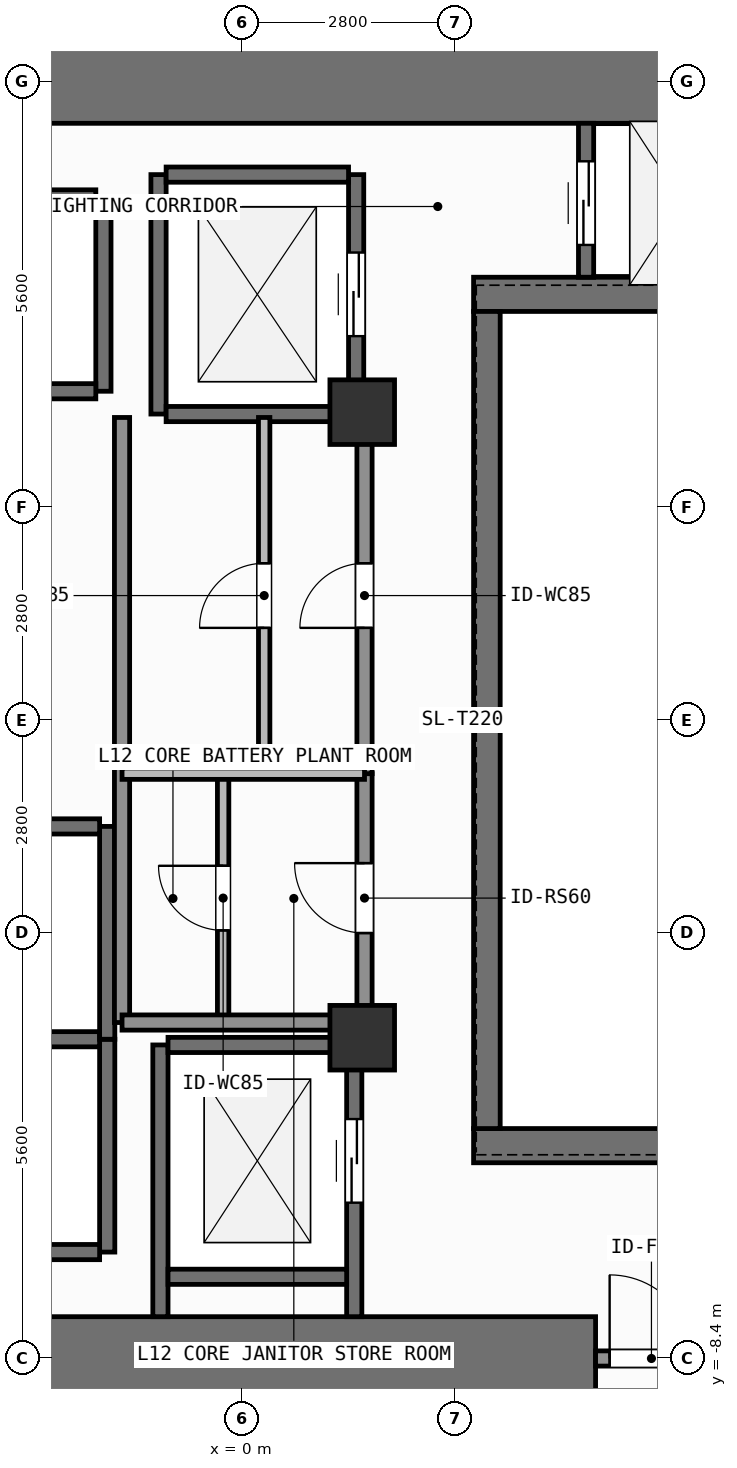
"""IFC4 building model, lengths in metres.
Left out: names, types, materials, properties, quantities, classifications, styles, units other than length and angle.
Written with IfcOpenShell. Run it as: python <this file> out.ifc"""

import sys

from ifc_helpers import new_model, si_unit, direction, frame, frame_2d, origin, origin_2d, place, context, subcontext, project, spatial, rectangle, extrude, element, fill, save


model = new_model("IFC4")
c1 = context("Model", 3, precision=1e-05, world=origin(), true_north=direction((0.0, 1.0)))
c2 = subcontext(c1, "Body", "Model", "MODEL_VIEW")
j1 = project(units=[si_unit("LENGTHUNIT", "METRE"), si_unit("PLANEANGLEUNIT", "RADIAN")], contexts=[c1])
p1 = place(None, origin())
s1 = spatial("IfcSite", under=j1, at=p1, CompositionType="ELEMENT")
p2 = place(p1, origin())
s2 = spatial("IfcBuilding", under=s1, at=p2, CompositionType="ELEMENT")
p3 = place(p2, frame((0.0, 0.0, 46.2)))
s3 = spatial("IfcBuildingStorey", under=s2, at=p3, CompositionType="ELEMENT", Elevation=46.2)
p4 = place(p3, frame((-2.62, -8.4, 0.0), z_axis=(0.0, 0.0, 1.0), x_axis=(1.0, 0.0, 0.0)))
e1 = element("IfcWall", 1, at=p4, inside=s3, PredefinedType="SHEAR", context=c2, shape_type="SweptSolid", body=[
    extrude(rectangle(XDim=7.27, YDim=1.1, at=frame_2d((3.635, 0.0))), origin(), (0.0, 0.0, 1.0), 3.9),
])
p5 = place(p3, frame((-7.55, 8.4, 0.0), z_axis=(0.0, 0.0, 1.0), x_axis=(1.0, 0.0, 0.0)))
e2 = element("IfcWall", 2, at=p5, inside=s3, PredefinedType="SHEAR", context=c2, shape_type="SweptSolid", body=[
    extrude(rectangle(XDim=16.5, YDim=1.1, at=frame_2d((8.25, 0.0))), origin(), (0.0, 0.0, 1.0), 3.9),
])
for number, where, z_axis, x_axis in (
    (3, (3.045, -5.6, 0.0), (0.0, 0.0, 1.0), (1.0, 0.0, 0.0)),
    (4, (3.045, 5.6, 0.0), (0.0, 0.0, 1.0), (1.0, 0.0, 0.0)),
):
    element("IfcWall", number, at=place(p3, frame(where, z_axis=z_axis, x_axis=x_axis)), inside=s3, PredefinedType="SHEAR", context=c2, shape_type="SweptSolid", body=[
        extrude(rectangle(XDim=5.905, YDim=0.45, at=frame_2d((2.953, 0.0))), origin(), (0.0, 0.0, 1.0), 3.9),
    ])
p6 = place(p3, frame((3.22, -5.375, 0.0), z_axis=(0.0, 0.0, 1.0), x_axis=(0.0, 1.0, 0.0)))
e5 = element("IfcWall", 5, at=p6, inside=s3, PredefinedType="SHEAR", context=c2, shape_type="SweptSolid", body=[
    extrude(rectangle(XDim=10.75, YDim=0.35, at=frame_2d((5.375, 0.0))), origin(), (0.0, 0.0, 1.0), 3.9),
])
for number, where, z_axis, x_axis in (
    (6, (1.58, -4.18, 0.0), (0.0, 0.0, 1.0), (1.0, 0.0, 0.0)),
    (7, (1.58, 4.05, 0.0), (0.0, 0.0, 1.0), (1.0, 0.0, 0.0)),
):
    element("IfcColumn", number, at=place(p3, frame(where, z_axis=z_axis, x_axis=x_axis)), inside=s3, PredefinedType="COLUMN", context=c2, shape_type="SweptSolid", body=[
        extrude(rectangle(XDim=0.85, YDim=0.85, at=origin_2d()), origin(), (0.0, 0.0, 1.0), 3.9),
    ])
p7 = place(p3, frame((-1.825, 4.325, 0.0), z_axis=(0.0, 0.0, 1.0), x_axis=(0.0, 1.0, 0.0)))
e8 = element("IfcWall", 8, at=p7, inside=s3, PredefinedType="SHEAR", context=c2, shape_type="SweptSolid", body=[
    extrude(rectangle(XDim=2.55, YDim=0.2, at=frame_2d((1.275, 0.0))), origin(), (0.0, 0.0, 1.0), 3.68),
])
for number, where, z_axis, x_axis in (
    (9, (-4.275, 4.325, 0.0), (0.0, 0.0, 1.0), (1.0, 0.0, 0.0)),
    (10, (-4.275, 6.875, 0.0), (0.0, 0.0, 1.0), (1.0, 0.0, 0.0)),
):
    element("IfcWall", number, at=place(p3, frame(where, z_axis=z_axis, x_axis=x_axis)), inside=s3, PredefinedType="SHEAR", context=c2, shape_type="SweptSolid", body=[
        extrude(rectangle(XDim=2.35, YDim=0.2, at=frame_2d((1.175, 0.0))), origin(), (0.0, 0.0, 1.0), 3.68),
    ])
p8 = place(p3, frame((-1.775, -7.0, 0.0), z_axis=(0.0, 0.0, 1.0), x_axis=(0.0, 1.0, 0.0)))
e11 = element("IfcWall", 11, at=p8, inside=s3, PredefinedType="SHEAR", context=c2, shape_type="SweptSolid", body=[
    extrude(rectangle(XDim=2.8, YDim=0.2, at=frame_2d((1.4, 0.0))), origin(), (0.0, 0.0, 1.0), 3.68),
])
for number, where, z_axis, x_axis in (
    (12, (-4.325, -7.0, 0.0), (0.0, 0.0, 1.0), (1.0, 0.0, 0.0)),
    (13, (-4.325, -4.2, 0.0), (0.0, 0.0, 1.0), (1.0, 0.0, 0.0)),
):
    element("IfcWall", number, at=place(p3, frame(where, z_axis=z_axis, x_axis=x_axis)), inside=s3, PredefinedType="SHEAR", context=c2, shape_type="SweptSolid", body=[
        extrude(rectangle(XDim=2.45, YDim=0.2, at=frame_2d((1.225, 0.0))), origin(), (0.0, 0.0, 1.0), 3.68),
    ])
p9 = place(p3, frame((-1.775, -4.2, 0.0), z_axis=(0.0, 0.0, 1.0), x_axis=(0.0, 1.0, 0.0)))
e14 = element("IfcWall", 14, at=p9, inside=s3, PredefinedType="SHEAR", context=c2, shape_type="SweptSolid", body=[
    extrude(rectangle(XDim=2.8, YDim=0.2, at=frame_2d((1.4, 0.0))), origin(), (0.0, 0.0, 1.0), 3.68),
])
p10 = place(p3, frame((-4.325, -1.4, 0.0), z_axis=(0.0, 0.0, 1.0), x_axis=(1.0, 0.0, 0.0)))
e15 = element("IfcWall", 15, at=p10, inside=s3, PredefinedType="SHEAR", context=c2, shape_type="SweptSolid", body=[
    extrude(rectangle(XDim=2.45, YDim=0.2, at=frame_2d((1.225, 0.0))), origin(), (0.0, 0.0, 1.0), 3.68),
])
p11 = place(p3, frame((-1.1, 4.025, 0.0), z_axis=(0.0, 0.0, 1.0), x_axis=(0.0, 1.0, 0.0)))
e16 = element("IfcWall", 16, at=p11, inside=s3, PredefinedType="SHEAR", context=c2, shape_type="SweptSolid", body=[
    extrude(rectangle(XDim=3.15, YDim=0.2, at=frame_2d((1.575, 0.0))), origin(), (0.0, 0.0, 1.0), 3.68),
])
p12 = place(p3, frame((1.5, 4.025, 0.0), z_axis=(0.0, 0.0, 1.0), x_axis=(0.0, 1.0, 0.0)))
e17 = element("IfcWall", 17, at=p12, inside=s3, PredefinedType="SHEAR", context=c2, shape_type="SweptSolid", body=[
    extrude(rectangle(XDim=3.15, YDim=0.2, at=frame_2d((1.575, 0.0))), origin(), (0.0, 0.0, 1.0), 3.68),
])
p13 = place(p12, frame((1.025, 0.0, 0.0)))
e18 = element("IfcOpeningElement", 18, at=p13, cuts=e17, PredefinedType="OPENING", context=c2, shape_type="SweptSolid", body=[
    extrude(rectangle(XDim=1.1, YDim=2.2, at=frame_2d((0.55, 1.1))), frame((0.0, 0.11, 0.0), z_axis=(0.0, -1.0, 0.0), x_axis=(1.0, 0.0, 0.0)), (0.0, 0.0, 1.0), 0.22),
])
for number, where, z_axis, x_axis in (
    (19, (-1.0, 4.025, 0.0), (0.0, 0.0, 1.0), (1.0, 0.0, 0.0)),
    (20, (-1.0, 7.175, 0.0), (0.0, 0.0, 1.0), (1.0, 0.0, 0.0)),
):
    element("IfcWall", number, at=place(p3, frame(where, z_axis=z_axis, x_axis=x_axis)), inside=s3, PredefinedType="SHEAR", context=c2, shape_type="SweptSolid", body=[
        extrude(rectangle(XDim=2.4, YDim=0.2, at=frame_2d((1.2, 0.0))), origin(), (0.0, 0.0, 1.0), 3.68),
    ])
p14 = place(p3, frame((-1.075, -7.85, 0.0), z_axis=(0.0, 0.0, 1.0), x_axis=(0.0, 1.0, 0.0)))
e21 = element("IfcWall", 21, at=p14, inside=s3, PredefinedType="SHEAR", context=c2, shape_type="SweptSolid", body=[
    extrude(rectangle(XDim=3.575, YDim=0.2, at=frame_2d((1.788, 0.0))), origin(), (0.0, 0.0, 1.0), 3.68),
])
p15 = place(p3, frame((1.475, -7.85, 0.0), z_axis=(0.0, 0.0, 1.0), x_axis=(0.0, 1.0, 0.0)))
e22 = element("IfcWall", 22, at=p15, inside=s3, PredefinedType="SHEAR", context=c2, shape_type="SweptSolid", body=[
    extrude(rectangle(XDim=3.575, YDim=0.2, at=frame_2d((1.788, 0.0))), origin(), (0.0, 0.0, 1.0), 3.68),
])
p16 = place(p15, frame((1.5, 0.0, 0.0)))
e23 = element("IfcOpeningElement", 23, at=p16, cuts=e22, PredefinedType="OPENING", context=c2, shape_type="SweptSolid", body=[
    extrude(rectangle(XDim=1.1, YDim=2.2, at=frame_2d((0.55, 1.1))), frame((0.0, 0.11, 0.0), z_axis=(0.0, -1.0, 0.0), x_axis=(1.0, 0.0, 0.0)), (0.0, 0.0, 1.0), 0.22),
])
for number, where, z_axis, x_axis in (
    (24, (-0.975, -7.325, 0.0), (0.0, 0.0, 1.0), (1.0, 0.0, 0.0)),
    (25, (-0.975, -4.275, 0.0), (0.0, 0.0, 1.0), (1.0, 0.0, 0.0)),
):
    element("IfcWall", number, at=place(p3, frame(where, z_axis=z_axis, x_axis=x_axis)), inside=s3, PredefinedType="SHEAR", context=c2, shape_type="SweptSolid", body=[
        extrude(rectangle(XDim=2.35, YDim=0.2, at=frame_2d((1.175, 0.0))), origin(), (0.0, 0.0, 1.0), 3.68),
    ])
p17 = place(p3, frame((4.525, 5.825, 0.0), z_axis=(0.0, 0.0, 1.0), x_axis=(0.0, 1.0, 0.0)))
e26 = element("IfcWall", 26, at=p17, inside=s3, PredefinedType="SHEAR", context=c2, shape_type="SweptSolid", body=[
    extrude(rectangle(XDim=2.025, YDim=0.2, at=frame_2d((1.013, 0.0))), origin(), (0.0, 0.0, 1.0), 3.68),
])
p18 = place(p17, frame((0.425, 0.0, 0.0)))
e27 = element("IfcOpeningElement", 27, at=p18, cuts=e26, PredefinedType="OPENING", context=c2, shape_type="SweptSolid", body=[
    extrude(rectangle(XDim=1.1, YDim=2.2, at=frame_2d((0.55, 1.1))), frame((0.0, 0.11, 0.0), z_axis=(0.0, -1.0, 0.0), x_axis=(1.0, 0.0, 0.0)), (0.0, 0.0, 1.0), 0.22),
])
p19 = place(p3, frame((4.65, -8.4, 0.0), z_axis=(0.0, 0.0, 1.0), x_axis=(1.0, 0.0, 0.0)))
e28 = element("IfcWall", 28, at=p19, inside=s3, PredefinedType="SOLIDWALL", context=c2, shape_type="SweptSolid", body=[
    extrude(rectangle(XDim=1.47, YDim=0.2, at=frame_2d((0.735, 0.0))), origin(), (0.0, 0.0, 1.0), 2.72),
])
p20 = place(p19, frame((0.185, 0.0, 0.0)))
e29 = element("IfcOpeningElement", 29, at=p20, cuts=e28, PredefinedType="OPENING", context=c2, shape_type="SweptSolid", body=[
    extrude(rectangle(XDim=1.1, YDim=2.15, at=frame_2d((0.55, 1.075))), frame((0.0, 0.11, 0.0), z_axis=(0.0, -1.0, 0.0), x_axis=(1.0, 0.0, 0.0)), (0.0, 0.0, 1.0), 0.22),
])
p21 = place(p3, frame((-0.25, -3.98, 0.0), z_axis=(0.0, 0.0, 1.0), x_axis=(0.0, 1.0, 0.0)))
e30 = element("IfcWall", 30, at=p21, inside=s3, PredefinedType="PARTITIONING", context=c2, shape_type="SweptSolid", body=[
    extrude(rectangle(XDim=3.274, YDim=0.15, at=frame_2d((1.637, 0.0))), origin(), (0.0, 0.0, 1.0), 3.68),
])
p22 = place(p21, frame((1.212, 0.0, 0.0)))
e31 = element("IfcOpeningElement", 31, at=p22, cuts=e30, PredefinedType="OPENING", context=c2, shape_type="SweptSolid", body=[
    extrude(rectangle(XDim=0.85, YDim=2.1, at=frame_2d((0.425, 1.05))), frame((0.0, 0.085, 0.0), z_axis=(0.0, -1.0, 0.0), x_axis=(1.0, 0.0, 0.0)), (0.0, 0.0, 1.0), 0.17),
])
p23 = place(p3, frame((0.29, -0.706, 0.0), z_axis=(0.0, 0.0, 1.0), x_axis=(0.0, 1.0, 0.0)))
e32 = element("IfcWall", 32, at=p23, inside=s3, PredefinedType="PARTITIONING", context=c2, shape_type="SweptSolid", body=[
    extrude(rectangle(XDim=4.686, YDim=0.15, at=frame_2d((2.343, 0.0))), origin(), (0.0, 0.0, 1.0), 3.68),
])
p24 = place(p23, frame((1.918, 0.0, 0.0)))
e33 = element("IfcOpeningElement", 33, at=p24, cuts=e32, PredefinedType="OPENING", context=c2, shape_type="SweptSolid", body=[
    extrude(rectangle(XDim=0.85, YDim=2.1, at=frame_2d((0.425, 1.05))), frame((0.0, 0.085, 0.0), z_axis=(0.0, -1.0, 0.0), x_axis=(1.0, 0.0, 0.0)), (0.0, 0.0, 1.0), 0.17),
])
p25 = place(p3, frame((1.61, -3.98, 0.0), z_axis=(0.0, 0.0, 1.0), x_axis=(0.0, 1.0, 0.0)))
e34 = element("IfcWall", 34, at=p25, inside=s3, PredefinedType="SOLIDWALL", context=c2, shape_type="SweptSolid", body=[
    extrude(rectangle(XDim=3.274, YDim=0.2, at=frame_2d((1.637, 0.0))), origin(), (0.0, 0.0, 1.0), 3.68),
])
p26 = place(p25, frame((1.177, 0.0, 0.0)))
e35 = element("IfcOpeningElement", 35, at=p26, cuts=e34, PredefinedType="OPENING", context=c2, shape_type="SweptSolid", body=[
    extrude(rectangle(XDim=0.92, YDim=2.1, at=frame_2d((0.46, 1.05))), frame((0.0, 0.11, 0.0), z_axis=(0.0, -1.0, 0.0), x_axis=(1.0, 0.0, 0.0)), (0.0, 0.0, 1.0), 0.22),
])
p27 = place(p3, frame((1.61, -0.706, 0.0), z_axis=(0.0, 0.0, 1.0), x_axis=(0.0, 1.0, 0.0)))
e36 = element("IfcWall", 36, at=p27, inside=s3, PredefinedType="SOLIDWALL", context=c2, shape_type="SweptSolid", body=[
    extrude(rectangle(XDim=4.686, YDim=0.2, at=frame_2d((2.343, 0.0))), origin(), (0.0, 0.0, 1.0), 3.68),
])
p28 = place(p27, frame((1.918, 0.0, 0.0)))
e37 = element("IfcOpeningElement", 37, at=p28, cuts=e36, PredefinedType="OPENING", context=c2, shape_type="SweptSolid", body=[
    extrude(rectangle(XDim=0.85, YDim=2.1, at=frame_2d((0.425, 1.05))), frame((0.0, 0.11, 0.0), z_axis=(0.0, -1.0, 0.0), x_axis=(1.0, 0.0, 0.0)), (0.0, 0.0, 1.0), 0.22),
])
p29 = place(p3, frame((-1.58, -3.98, 0.0), z_axis=(0.0, 0.0, 1.0), x_axis=(0.0, 1.0, 0.0)))
e38 = element("IfcWall", 38, at=p29, inside=s3, PredefinedType="SOLIDWALL", context=c2, shape_type="SweptSolid", body=[
    extrude(rectangle(XDim=7.96, YDim=0.2, at=frame_2d((3.98, 0.0))), origin(), (0.0, 0.0, 1.0), 3.68),
])
p30 = place(p3, frame((-1.58, -3.98, 0.0), z_axis=(0.0, 0.0, 1.0), x_axis=(1.0, 0.0, 0.0)))
e39 = element("IfcWall", 39, at=p30, inside=s3, PredefinedType="SOLIDWALL", context=c2, shape_type="SweptSolid", body=[
    extrude(rectangle(XDim=3.19, YDim=0.2, at=frame_2d((1.595, 0.0))), origin(), (0.0, 0.0, 1.0), 3.68),
])
p31 = place(p3, frame((-1.58, -0.706, 0.0), z_axis=(0.0, 0.0, 1.0), x_axis=(1.0, 0.0, 0.0)))
e40 = element("IfcWall", 40, at=p31, inside=s3, PredefinedType="PARTITIONING", context=c2, shape_type="SweptSolid", body=[
    extrude(rectangle(XDim=3.19, YDim=0.15, at=frame_2d((1.595, 0.0))), origin(), (0.0, 0.0, 1.0), 3.68),
])
p32 = place(p13, origin())
e41 = element("IfcDoor", 41, at=p32, inside=s3, OperationType="SLIDING_TO_LEFT", PredefinedType="DOOR", context=c2, shape_type="SweptSolid", body=[
    extrude(rectangle(XDim=1.1, YDim=2.2, at=frame_2d((0.55, 1.1))), frame((0.0, 0.025, 0.0), z_axis=(0.0, -1.0, 0.0), x_axis=(1.0, 0.0, 0.0)), (0.0, 0.0, 1.0), 0.05),
])
fill(e18, e41)
p33 = place(p16, origin())
e42 = element("IfcDoor", 42, at=p33, inside=s3, OperationType="SLIDING_TO_LEFT", PredefinedType="DOOR", context=c2, shape_type="SweptSolid", body=[
    extrude(rectangle(XDim=1.1, YDim=2.2, at=frame_2d((0.55, 1.1))), frame((0.0, 0.025, 0.0), z_axis=(0.0, -1.0, 0.0), x_axis=(1.0, 0.0, 0.0)), (0.0, 0.0, 1.0), 0.05),
])
fill(e23, e42)
p34 = place(p18, origin())
e43 = element("IfcDoor", 43, at=p34, inside=s3, OperationType="SLIDING_TO_LEFT", PredefinedType="DOOR", context=c2, shape_type="SweptSolid", body=[
    extrude(rectangle(XDim=1.1, YDim=2.2, at=frame_2d((0.55, 1.1))), frame((0.0, 0.025, 0.0), z_axis=(0.0, -1.0, 0.0), x_axis=(1.0, 0.0, 0.0)), (0.0, 0.0, 1.0), 0.05),
])
fill(e27, e43)
p35 = place(p20, origin())
e44 = element("IfcDoor", 44, at=p35, inside=s3, OperationType="SINGLE_SWING_LEFT", PredefinedType="DOOR", context=c2, shape_type="SweptSolid", body=[
    extrude(rectangle(XDim=1.1, YDim=2.15, at=frame_2d((0.55, 1.075))), frame((0.0, 0.025, 0.0), z_axis=(0.0, -1.0, 0.0), x_axis=(1.0, 0.0, 0.0)), (0.0, 0.0, 1.0), 0.05),
])
fill(e29, e44)
p36 = place(p22, origin())
e45 = element("IfcDoor", 45, at=p36, inside=s3, OperationType="SINGLE_SWING_RIGHT", PredefinedType="DOOR", context=c2, shape_type="SweptSolid", body=[
    extrude(rectangle(XDim=0.85, YDim=2.1, at=frame_2d((0.425, 1.05))), frame((0.0, 0.025, 0.0), z_axis=(0.0, -1.0, 0.0), x_axis=(1.0, 0.0, 0.0)), (0.0, 0.0, 1.0), 0.05),
])
fill(e31, e45)
p37 = place(p24, origin())
e46 = element("IfcDoor", 46, at=p37, inside=s3, OperationType="SINGLE_SWING_LEFT", PredefinedType="DOOR", context=c2, shape_type="SweptSolid", body=[
    extrude(rectangle(XDim=0.85, YDim=2.1, at=frame_2d((0.425, 1.05))), frame((0.0, 0.025, 0.0), z_axis=(0.0, -1.0, 0.0), x_axis=(1.0, 0.0, 0.0)), (0.0, 0.0, 1.0), 0.05),
])
fill(e33, e46)
p38 = place(p26, origin())
e47 = element("IfcDoor", 47, at=p38, inside=s3, OperationType="SINGLE_SWING_RIGHT", PredefinedType="DOOR", context=c2, shape_type="SweptSolid", body=[
    extrude(rectangle(XDim=0.92, YDim=2.1, at=frame_2d((0.46, 1.05))), frame((0.0, 0.025, 0.0), z_axis=(0.0, -1.0, 0.0), x_axis=(1.0, 0.0, 0.0)), (0.0, 0.0, 1.0), 0.05),
])
fill(e35, e47)
p39 = place(p28, origin())
e48 = element("IfcDoor", 48, at=p39, inside=s3, OperationType="SINGLE_SWING_LEFT", PredefinedType="DOOR", context=c2, shape_type="SweptSolid", body=[
    extrude(rectangle(XDim=0.85, YDim=2.1, at=frame_2d((0.425, 1.05))), frame((0.0, 0.025, 0.0), z_axis=(0.0, -1.0, 0.0), x_axis=(1.0, 0.0, 0.0)), (0.0, 0.0, 1.0), 0.05),
])
fill(e37, e48)
save(model, sys.argv[1])
